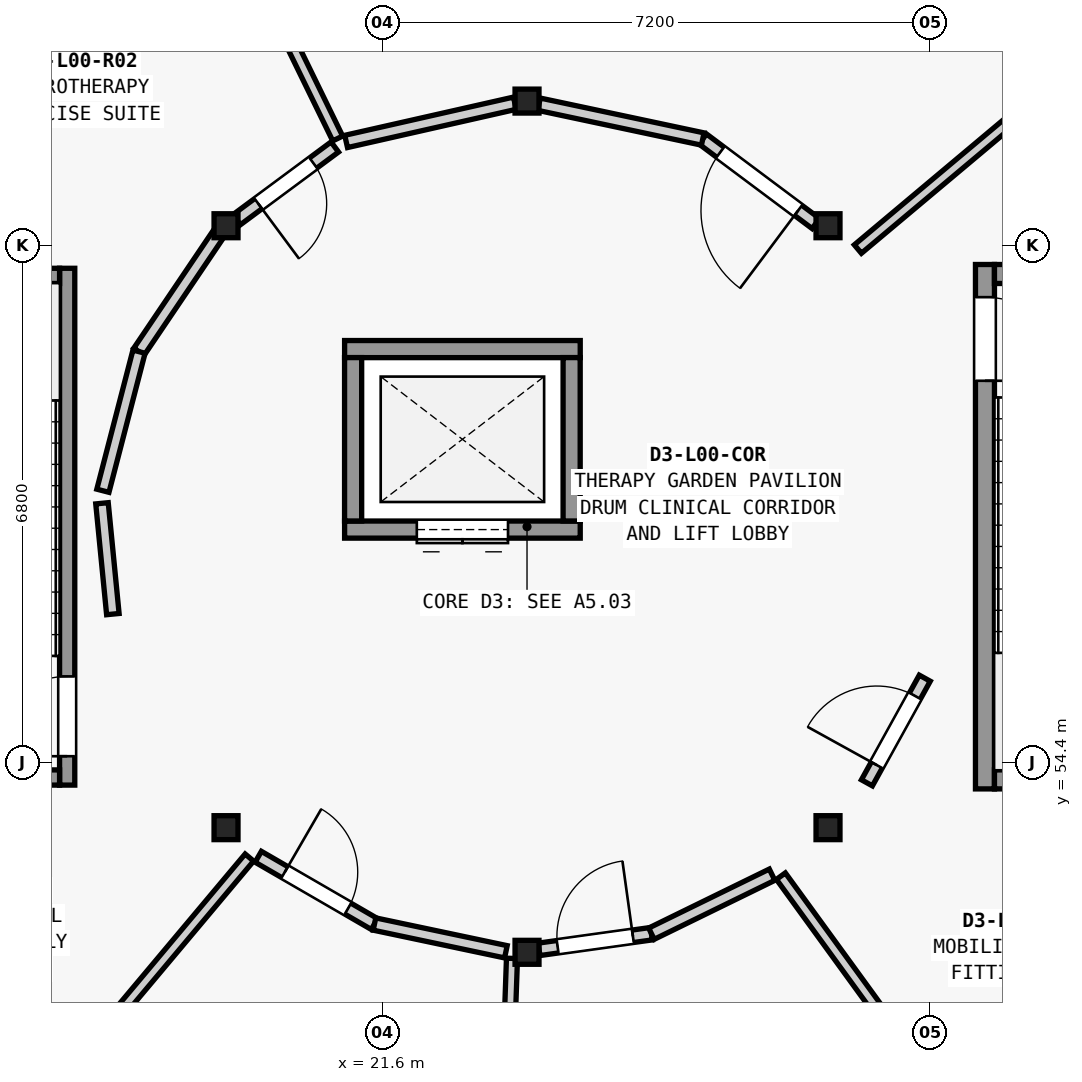
"""IFC4 building model, lengths in metres.
Left out: names, types, materials, properties, quantities, classifications, styles, units other than length and angle.
Written with IfcOpenShell. Run it as: python <this file> out.ifc"""

import sys

from ifc_helpers import new_model, si_unit, direction, frame, frame_2d, origin, origin_2d, place, context, subcontext, project, spatial, rectangle, extrude, element, fill, save


model = new_model("IFC4")
c1 = context("Model", 3, precision=1e-05, world=origin(), true_north=direction((0.0, 1.0)))
c2 = subcontext(c1, "Body", "Model", "MODEL_VIEW")
j1 = project(units=[si_unit("LENGTHUNIT", "METRE"), si_unit("PLANEANGLEUNIT", "RADIAN")], contexts=[c1])
p1 = place(None, origin())
s1 = spatial("IfcSite", under=j1, at=p1, CompositionType="ELEMENT")
p2 = place(p1, origin())
s2 = spatial("IfcBuilding", under=s1, at=p2, CompositionType="ELEMENT")
p3 = place(p2, origin())
s3 = spatial("IfcBuildingStorey", under=s2, at=p3, CompositionType="ELEMENT", Elevation=0.0)
for number, where, z_axis, x_axis in (
    (1, (27.46, 61.46, 0.0), (0.0, 0.0, 1.0), (1.0, 0.0, 0.0)),
    (2, (23.5, 63.1, 0.0), (0.0, 0.0, 1.0), (1.0, 0.0, 0.0)),
    (3, (19.54, 61.46, 0.0), (0.0, 0.0, 1.0), (1.0, 0.0, 0.0)),
    (4, (19.54, 53.54, 0.0), (0.0, 0.0, 1.0), (1.0, 0.0, 0.0)),
    (5, (23.5, 51.9, 0.0), (0.0, 0.0, 1.0), (1.0, 0.0, 0.0)),
    (6, (27.46, 53.54, 0.0), (0.0, 0.0, 1.0), (1.0, 0.0, 0.0)),
):
    element("IfcColumn", number, at=place(p3, frame(where, z_axis=z_axis, x_axis=x_axis)), inside=s3, PredefinedType="COLUMN", context=c2, shape_type="SweptSolid", body=[
        extrude(rectangle(XDim=0.315, YDim=0.315, at=origin_2d()), origin(), (0.0, 0.0, 1.0), 4.55),
    ])
p4 = place(p3, frame((29.525, 60.95, 0.0), z_axis=(0.0, 0.0, 1.0), x_axis=(0.0, -1.0, 0.0)))
e7 = element("IfcWall", 7, at=p4, inside=s3, PredefinedType="SHEAR", context=c2, shape_type="SweptSolid", body=[
    extrude(rectangle(XDim=6.9, YDim=0.25, at=frame_2d((3.45, 0.0))), origin(), (0.0, 0.0, 1.0), 4.305),
])
p5 = place(p4, frame((0.43, 0.0, 0.0)))
e8 = element("IfcOpeningElement", 8, at=p5, cuts=e7, PredefinedType="OPENING", context=c2, shape_type="SweptSolid", body=[
    extrude(rectangle(XDim=1.1, YDim=2.15, at=frame_2d((0.55, 1.075))), frame((0.0, 0.135, 0.0), z_axis=(0.0, -1.0, 0.0), x_axis=(1.0, 0.0, 0.0)), (0.0, 0.0, 1.0), 0.27),
])
for number, where, z_axis, x_axis in (
    (9, (29.65, 60.825, 0.0), (0.0, 0.0, 1.0), (1.0, 0.0, 0.0)),
    (10, (29.65, 54.175, 0.0), (0.0, 0.0, 1.0), (1.0, 0.0, 0.0)),
):
    element("IfcWall", number, at=place(p3, frame(where, z_axis=z_axis, x_axis=x_axis)), inside=s3, PredefinedType="SHEAR", context=c2, shape_type="SweptSolid", body=[
        extrude(rectangle(XDim=2.9, YDim=0.25, at=frame_2d((1.45, 0.0))), origin(), (0.0, 0.0, 1.0), 4.305),
    ])
p6 = place(p3, frame((17.45, 54.1, 0.0), z_axis=(0.0, 0.0, 1.0), x_axis=(0.0, 1.0, 0.0)))
e11 = element("IfcWall", 11, at=p6, inside=s3, PredefinedType="SHEAR", context=c2, shape_type="SweptSolid", body=[
    extrude(rectangle(XDim=6.8, YDim=0.2, at=frame_2d((3.4, 0.0))), origin(), (0.0, 0.0, 1.0), 4.305),
])
p7 = place(p6, frame((0.38, 0.0, 0.0)))
e12 = element("IfcOpeningElement", 12, at=p7, cuts=e11, PredefinedType="OPENING", context=c2, shape_type="SweptSolid", body=[
    extrude(rectangle(XDim=1.05, YDim=2.15, at=frame_2d((0.525, 1.075))), frame((0.0, 0.11, 0.0), z_axis=(0.0, -1.0, 0.0), x_axis=(1.0, 0.0, 0.0)), (0.0, 0.0, 1.0), 0.22),
])
for number, where, z_axis, x_axis in (
    (13, (17.35, 54.2, 0.0), (0.0, 0.0, 1.0), (-1.0, 0.0, 0.0)),
    (14, (17.35, 60.8, 0.0), (0.0, 0.0, 1.0), (-1.0, 0.0, 0.0)),
):
    element("IfcWall", number, at=place(p3, frame(where, z_axis=z_axis, x_axis=x_axis)), inside=s3, PredefinedType="SHEAR", context=c2, shape_type="SweptSolid", body=[
        extrude(rectangle(XDim=2.9, YDim=0.2, at=frame_2d((1.45, 0.0))), origin(), (0.0, 0.0, 1.0), 4.305),
    ])
p8 = place(p3, frame((21.1, 57.462, 0.0), z_axis=(0.0, 0.0, 1.0), x_axis=(1.0, 0.0, 0.0)))
e15 = element("IfcWall", 15, at=p8, inside=s3, PredefinedType="SHEAR", context=c2, shape_type="SweptSolid", body=[
    extrude(rectangle(XDim=3.1, YDim=0.225, at=frame_2d((1.55, 0.0))), origin(), (0.0, 0.0, 1.0), 4.305),
])
p9 = place(p8, frame((0.95, 0.0, 0.0)))
e16 = element("IfcOpeningElement", 16, at=p9, cuts=e15, PredefinedType="OPENING", context=c2, shape_type="SweptSolid", body=[
    extrude(rectangle(XDim=1.2, YDim=2.2, at=frame_2d((0.6, 1.1))), frame((0.0, 0.123, 0.0), z_axis=(0.0, -1.0, 0.0), x_axis=(1.0, 0.0, 0.0)), (0.0, 0.0, 1.0), 0.245),
])
p10 = place(p3, frame((21.1, 59.837, 0.0), z_axis=(0.0, 0.0, 1.0), x_axis=(1.0, 0.0, 0.0)))
e17 = element("IfcWall", 17, at=p10, inside=s3, PredefinedType="SHEAR", context=c2, shape_type="SweptSolid", body=[
    extrude(rectangle(XDim=3.1, YDim=0.225, at=frame_2d((1.55, 0.0))), origin(), (0.0, 0.0, 1.0), 4.305),
])
for number, where, z_axis, x_axis in (
    (18, (21.212, 57.575, 0.0), (0.0, 0.0, 1.0), (0.0, 1.0, 0.0)),
    (19, (24.087, 57.575, 0.0), (0.0, 0.0, 1.0), (0.0, 1.0, 0.0)),
):
    element("IfcWall", number, at=place(p3, frame(where, z_axis=z_axis, x_axis=x_axis)), inside=s3, PredefinedType="SHEAR", context=c2, shape_type="SweptSolid", body=[
        extrude(rectangle(XDim=2.15, YDim=0.225, at=frame_2d((1.075, 0.0))), origin(), (0.0, 0.0, 1.0), 4.305),
    ])
p11 = place(p3, frame((27.853, 61.153, 0.0), z_axis=(0.0, 0.0, 1.0), x_axis=(0.766177182771, 0.64262938355, 0.0)))
e20 = element("IfcWall", 20, at=p11, inside=s3, PredefinedType="PARTITIONING", context=c2, shape_type="SweptSolid", body=[
    extrude(rectangle(XDim=4.59, YDim=0.145, at=frame_2d((2.295, 0.0))), origin(), (0.0, 0.0, 1.0), 3.634),
])
p12 = place(p3, frame((21.009, 62.608, 0.0), z_axis=(0.0, 0.0, 1.0), x_axis=(-0.438421545089, 0.898769463657, 0.0)))
e21 = element("IfcWall", 21, at=p12, inside=s3, PredefinedType="PARTITIONING", context=c2, shape_type="SweptSolid", body=[
    extrude(rectangle(XDim=4.61, YDim=0.145, at=frame_2d((2.305, 0.0))), origin(), (0.0, 0.0, 1.0), 3.634),
])
p13 = place(p3, frame((19.847, 53.147, 0.0), z_axis=(0.0, 0.0, 1.0), x_axis=(-0.64262938355, -0.766177182771, 0.0)))
e22 = element("IfcWall", 22, at=p13, inside=s3, PredefinedType="PARTITIONING", context=c2, shape_type="SweptSolid", body=[
    extrude(rectangle(XDim=4.59, YDim=0.145, at=frame_2d((2.295, 0.0))), origin(), (0.0, 0.0, 1.0), 3.634),
])
p14 = place(p3, frame((23.302, 51.82, 0.0), z_axis=(0.0, 0.0, 1.0), x_axis=(-0.034908318573, -0.999390518914, 0.0)))
e23 = element("IfcWall", 23, at=p14, inside=s3, PredefinedType="PARTITIONING", context=c2, shape_type="SweptSolid", body=[
    extrude(rectangle(XDim=4.581, YDim=0.145, at=frame_2d((2.291, 0.0))), origin(), (0.0, 0.0, 1.0), 3.634),
])
p15 = place(p3, frame((26.84, 52.902, 0.0), z_axis=(0.0, 0.0, 1.0), x_axis=(0.587873334136, -0.808952991843, 0.0)))
e24 = element("IfcWall", 24, at=p15, inside=s3, PredefinedType="PARTITIONING", context=c2, shape_type="SweptSolid", body=[
    extrude(rectangle(XDim=4.574, YDim=0.145, at=frame_2d((2.287, 0.0))), origin(), (0.0, 0.0, 1.0), 3.634),
])
p16 = place(p3, frame((27.3, 61.489, 0.0), z_axis=(0.0, 0.0, 1.0), x_axis=(-0.801023932766, 0.598632323831, 0.0)))
e25 = element("IfcWall", 25, at=p16, inside=s3, PredefinedType="PARTITIONING", context=c2, shape_type="SweptSolid", body=[
    extrude(rectangle(XDim=1.858, YDim=0.165, at=frame_2d((0.929, 0.0))), origin(), (0.0, 0.0, 1.0), 3.634),
])
p17 = place(p16, frame((0.289, 0.0, 0.0)))
e26 = element("IfcOpeningElement", 26, at=p17, cuts=e25, PredefinedType="OPENING", context=c2, shape_type="SweptSolid", body=[
    extrude(rectangle(XDim=1.28, YDim=2.3, at=frame_2d((0.64, 1.15))), frame((0.0, 0.093, 0.0), z_axis=(0.0, -1.0, 0.0), x_axis=(1.0, 0.0, 0.0)), (0.0, 0.0, 1.0), 0.185),
])
p18 = place(p3, frame((25.812, 62.601, 0.0), z_axis=(0.0, 0.0, 1.0), x_axis=(-0.978152936259, 0.207886587563, 0.0)))
e27 = element("IfcWall", 27, at=p18, inside=s3, PredefinedType="PARTITIONING", context=c2, shape_type="SweptSolid", body=[
    extrude(rectangle(XDim=2.203, YDim=0.165, at=frame_2d((1.102, 0.0))), origin(), (0.0, 0.0, 1.0), 3.634),
])
p19 = place(p3, frame((23.34, 63.072, 0.0), z_axis=(0.0, 0.0, 1.0), x_axis=(-0.975285396453, -0.2209488526, 0.0)))
e28 = element("IfcWall", 28, at=p19, inside=s3, PredefinedType="PARTITIONING", context=c2, shape_type="SweptSolid", body=[
    extrude(rectangle(XDim=2.276, YDim=0.165, at=frame_2d((1.138, 0.0))), origin(), (0.0, 0.0, 1.0), 3.634),
])
p20 = place(p3, frame((20.971, 62.496, 0.0), z_axis=(0.0, 0.0, 1.0), x_axis=(-0.803417109956, -0.59541661669, 0.0)))
e29 = element("IfcWall", 29, at=p20, inside=s3, PredefinedType="PARTITIONING", context=c2, shape_type="SweptSolid", body=[
    extrude(rectangle(XDim=1.606, YDim=0.165, at=frame_2d((0.803, 0.0))), origin(), (0.0, 0.0, 1.0), 3.634),
])
p21 = place(p20, frame((0.353, 0.0, 0.0)))
e30 = element("IfcOpeningElement", 30, at=p21, cuts=e29, PredefinedType="OPENING", context=c2, shape_type="SweptSolid", body=[
    extrude(rectangle(XDim=0.9, YDim=2.1, at=frame_2d((0.45, 1.05))), frame((0.0, 0.093, 0.0), z_axis=(0.0, -1.0, 0.0), x_axis=(1.0, 0.0, 0.0)), (0.0, 0.0, 1.0), 0.185),
])
p22 = place(p3, frame((19.432, 61.339, 0.0), z_axis=(0.0, 0.0, 1.0), x_axis=(-0.559463805142, -0.828854782659, 0.0)))
e31 = element("IfcWall", 31, at=p22, inside=s3, PredefinedType="PARTITIONING", context=c2, shape_type="SweptSolid", body=[
    extrude(rectangle(XDim=1.853, YDim=0.165, at=frame_2d((0.927, 0.0))), origin(), (0.0, 0.0, 1.0), 3.634),
])
p23 = place(p3, frame((18.395, 59.803, 0.0), z_axis=(0.0, 0.0, 1.0), x_axis=(-0.251275827958, -0.967915522287, 0.0)))
e32 = element("IfcWall", 32, at=p23, inside=s3, PredefinedType="PARTITIONING", context=c2, shape_type="SweptSolid", body=[
    extrude(rectangle(XDim=1.891, YDim=0.165, at=frame_2d((0.945, 0.0))), origin(), (0.0, 0.0, 1.0), 3.634),
])
p24 = place(p3, frame((17.908, 57.808, 0.0), z_axis=(0.0, 0.0, 1.0), x_axis=(0.097655572539, -0.995220271675, 0.0)))
e33 = element("IfcWall", 33, at=p24, inside=s3, PredefinedType="PARTITIONING", context=c2, shape_type="SweptSolid", body=[
    extrude(rectangle(XDim=1.465, YDim=0.165, at=frame_2d((0.732, 0.0))), origin(), (0.0, 0.0, 1.0), 3.634),
])
p25 = place(p3, frame((19.964, 53.157, 0.0), z_axis=(0.0, 0.0, 1.0), x_axis=(0.865448363254, -0.500998134269, 0.0)))
e34 = element("IfcWall", 34, at=p25, inside=s3, PredefinedType="PARTITIONING", context=c2, shape_type="SweptSolid", body=[
    extrude(rectangle(XDim=1.767, YDim=0.165, at=frame_2d((0.883, 0.0))), origin(), (0.0, 0.0, 1.0), 3.634),
])
p26 = place(p25, frame((0.403, 0.0, 0.0)))
e35 = element("IfcOpeningElement", 35, at=p26, cuts=e34, PredefinedType="OPENING", context=c2, shape_type="SweptSolid", body=[
    extrude(rectangle(XDim=0.96, YDim=2.12, at=frame_2d((0.48, 1.06))), frame((0.0, 0.093, 0.0), z_axis=(0.0, -1.0, 0.0), x_axis=(1.0, 0.0, 0.0)), (0.0, 0.0, 1.0), 0.185),
])
p27 = place(p3, frame((21.493, 52.272, 0.0), z_axis=(0.0, 0.0, 1.0), x_axis=(0.978436766116, -0.206546592113, 0.0)))
e36 = element("IfcWall", 36, at=p27, inside=s3, PredefinedType="PARTITIONING", context=c2, shape_type="SweptSolid", body=[
    extrude(rectangle(XDim=1.767, YDim=0.165, at=frame_2d((0.884, 0.0))), origin(), (0.0, 0.0, 1.0), 3.634),
])
p28 = place(p3, frame((23.658, 51.939, 0.0), z_axis=(0.0, 0.0, 1.0), x_axis=(0.99043401567, 0.137987175508, 0.0)))
e37 = element("IfcWall", 37, at=p28, inside=s3, PredefinedType="PARTITIONING", context=c2, shape_type="SweptSolid", body=[
    extrude(rectangle(XDim=1.493, YDim=0.165, at=frame_2d((0.747, 0.0))), origin(), (0.0, 0.0, 1.0), 3.634),
])
p29 = place(p28, frame((0.247, 0.0, 0.0)))
e38 = element("IfcOpeningElement", 38, at=p29, cuts=e37, PredefinedType="OPENING", context=c2, shape_type="SweptSolid", body=[
    extrude(rectangle(XDim=1.0, YDim=2.14, at=frame_2d((0.5, 1.07))), frame((0.0, 0.093, 0.0), z_axis=(0.0, -1.0, 0.0), x_axis=(1.0, 0.0, 0.0)), (0.0, 0.0, 1.0), 0.185),
])
p30 = place(p3, frame((25.137, 52.145, 0.0), z_axis=(0.0, 0.0, 1.0), x_axis=(0.898398901361, 0.439180388944, 0.0)))
e39 = element("IfcWall", 39, at=p30, inside=s3, PredefinedType="PARTITIONING", context=c2, shape_type="SweptSolid", body=[
    extrude(rectangle(XDim=1.767, YDim=0.165, at=frame_2d((0.883, 0.0))), origin(), (0.0, 0.0, 1.0), 3.634),
])
p31 = place(p3, frame((27.972, 54.13, 0.0), z_axis=(0.0, 0.0, 1.0), x_axis=(0.483639192056, 0.875267463069, 0.0)))
e40 = element("IfcWall", 40, at=p31, inside=s3, PredefinedType="PARTITIONING", context=c2, shape_type="SweptSolid", body=[
    extrude(rectangle(XDim=1.573, YDim=0.165, at=frame_2d((0.787, 0.0))), origin(), (0.0, 0.0, 1.0), 3.634),
])
p32 = place(p31, frame((0.267, 0.0, 0.0)))
e41 = element("IfcOpeningElement", 41, at=p32, cuts=e40, PredefinedType="OPENING", context=c2, shape_type="SweptSolid", body=[
    extrude(rectangle(XDim=1.04, YDim=2.14, at=frame_2d((0.52, 1.07))), frame((0.0, 0.093, 0.0), z_axis=(0.0, -1.0, 0.0), x_axis=(1.0, 0.0, 0.0)), (0.0, 0.0, 1.0), 0.185),
])
p33 = place(p5, origin())
e42 = element("IfcDoor", 42, at=p33, inside=s3, OperationType="SINGLE_SWING_RIGHT", PredefinedType="DOOR", context=c2, shape_type="SweptSolid", body=[
    extrude(rectangle(XDim=1.1, YDim=2.15, at=frame_2d((0.55, 1.075))), frame((0.0, 0.025, 0.0), z_axis=(0.0, -1.0, 0.0), x_axis=(1.0, 0.0, 0.0)), (0.0, 0.0, 1.0), 0.05),
])
fill(e8, e42)
p34 = place(p7, origin())
e43 = element("IfcDoor", 43, at=p34, inside=s3, OperationType="SINGLE_SWING_LEFT", PredefinedType="DOOR", context=c2, shape_type="SweptSolid", body=[
    extrude(rectangle(XDim=1.05, YDim=2.15, at=frame_2d((0.525, 1.075))), frame((0.0, 0.025, 0.0), z_axis=(0.0, -1.0, 0.0), x_axis=(1.0, 0.0, 0.0)), (0.0, 0.0, 1.0), 0.05),
])
fill(e12, e43)
p35 = place(p9, origin())
e44 = element("IfcDoor", 44, at=p35, inside=s3, OperationType="DOUBLE_DOOR_SLIDING", PredefinedType="DOOR", context=c2, shape_type="SweptSolid", body=[
    extrude(rectangle(XDim=1.2, YDim=2.2, at=frame_2d((0.6, 1.1))), frame((0.0, 0.025, 0.0), z_axis=(0.0, -1.0, 0.0), x_axis=(1.0, 0.0, 0.0)), (0.0, 0.0, 1.0), 0.05),
])
fill(e16, e44)
p36 = place(p17, origin())
e45 = element("IfcDoor", 45, at=p36, inside=s3, OperationType="SINGLE_SWING_LEFT", PredefinedType="DOOR", context=c2, shape_type="SweptSolid", body=[
    extrude(rectangle(XDim=1.28, YDim=2.3, at=frame_2d((0.64, 1.15))), frame((0.0, 0.025, 0.0), z_axis=(0.0, -1.0, 0.0), x_axis=(1.0, 0.0, 0.0)), (0.0, 0.0, 1.0), 0.05),
])
fill(e26, e45)
p37 = place(p21, origin())
e46 = element("IfcDoor", 46, at=p37, inside=s3, OperationType="SINGLE_SWING_RIGHT", PredefinedType="DOOR", context=c2, shape_type="SweptSolid", body=[
    extrude(rectangle(XDim=0.9, YDim=2.1, at=frame_2d((0.45, 1.05))), frame((0.0, 0.025, 0.0), z_axis=(0.0, -1.0, 0.0), x_axis=(1.0, 0.0, 0.0)), (0.0, 0.0, 1.0), 0.05),
])
fill(e30, e46)
p38 = place(p26, origin())
e47 = element("IfcDoor", 47, at=p38, inside=s3, OperationType="SINGLE_SWING_LEFT", PredefinedType="DOOR", context=c2, shape_type="SweptSolid", body=[
    extrude(rectangle(XDim=0.96, YDim=2.12, at=frame_2d((0.48, 1.06))), frame((0.0, 0.025, 0.0), z_axis=(0.0, -1.0, 0.0), x_axis=(1.0, 0.0, 0.0)), (0.0, 0.0, 1.0), 0.05),
])
fill(e35, e47)
p39 = place(p29, origin())
e48 = element("IfcDoor", 48, at=p39, inside=s3, OperationType="SINGLE_SWING_RIGHT", PredefinedType="DOOR", context=c2, shape_type="SweptSolid", body=[
    extrude(rectangle(XDim=1.0, YDim=2.14, at=frame_2d((0.5, 1.07))), frame((0.0, 0.025, 0.0), z_axis=(0.0, -1.0, 0.0), x_axis=(1.0, 0.0, 0.0)), (0.0, 0.0, 1.0), 0.05),
])
fill(e38, e48)
p40 = place(p32, origin())
e49 = element("IfcDoor", 49, at=p40, inside=s3, OperationType="SINGLE_SWING_LEFT", PredefinedType="DOOR", context=c2, shape_type="SweptSolid", body=[
    extrude(rectangle(XDim=1.04, YDim=2.14, at=frame_2d((0.52, 1.07))), frame((0.0, 0.025, 0.0), z_axis=(0.0, -1.0, 0.0), x_axis=(1.0, 0.0, 0.0)), (0.0, 0.0, 1.0), 0.05),
])
fill(e41, e49)
save(model, sys.argv[1])
